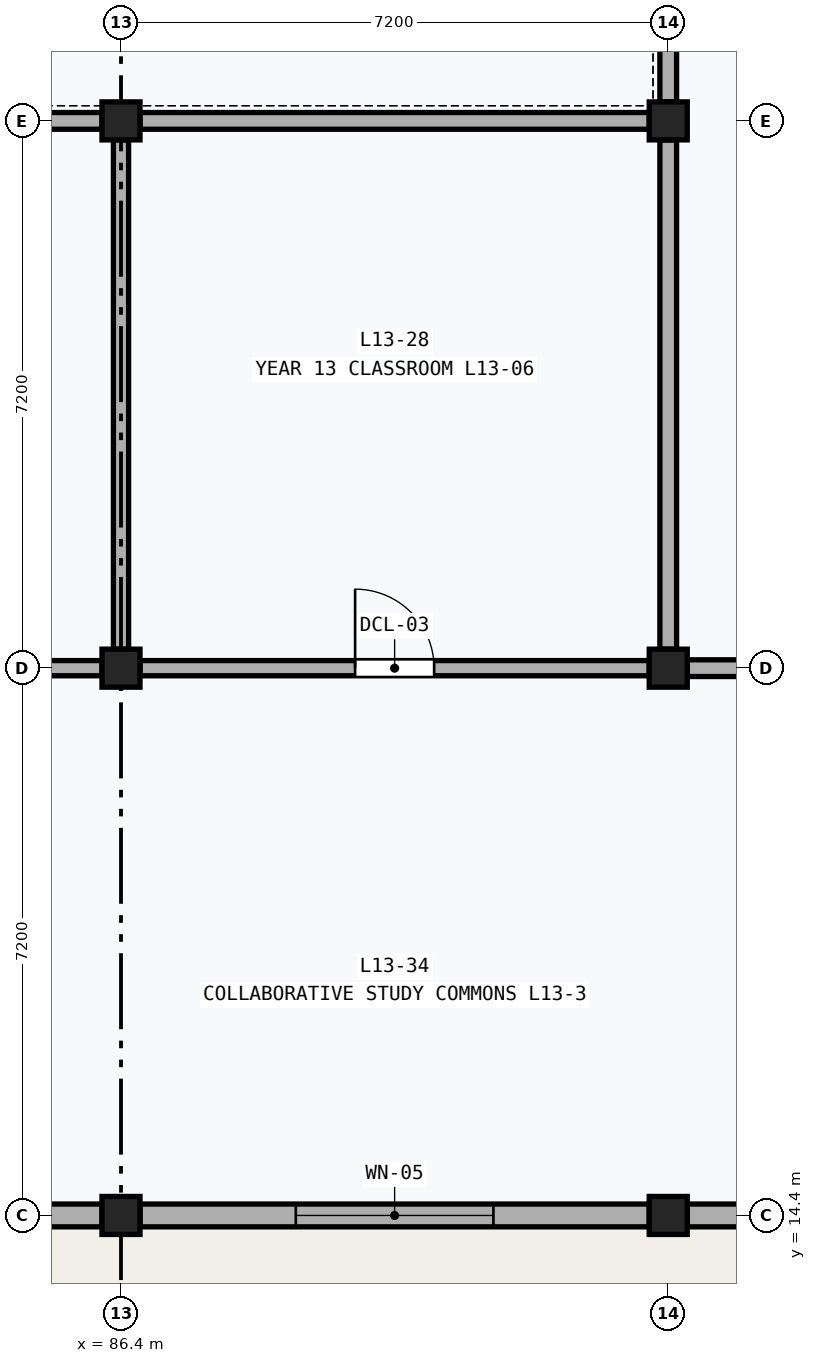
"""IFC4 building model, lengths in metres.
Left out: names, types, materials, properties, quantities, classifications, styles, units other than length and angle.
Written with IfcOpenShell. Run it as: python <this file> out.ifc"""

import sys

from ifc_helpers import new_model, si_unit, direction, frame, frame_2d, origin, origin_2d, place, context, subcontext, project, spatial, rectangle, extrude, element, fill, save


model = new_model("IFC4")
c1 = context("Model", 3, precision=1e-05, world=origin(), true_north=direction((0.0, 1.0)))
c2 = subcontext(c1, "Body", "Model", "MODEL_VIEW")
j1 = project(units=[si_unit("LENGTHUNIT", "METRE"), si_unit("PLANEANGLEUNIT", "RADIAN")], contexts=[c1])
p1 = place(None, origin())
s1 = spatial("IfcSite", under=j1, at=p1, CompositionType="ELEMENT")
p2 = place(p1, origin())
s2 = spatial("IfcBuilding", under=s1, at=p2, CompositionType="ELEMENT")
p3 = place(p2, frame((0.0, 0.0, 55.0)))
s3 = spatial("IfcBuildingStorey", under=s2, at=p3, CompositionType="ELEMENT", Elevation=55.0)
for number, where, z_axis, x_axis in (
    (1, (86.4, 14.4, 0.0), (0.0, 0.0, 1.0), (1.0, 0.0, 0.0)),
    (2, (86.4, 21.6, 0.0), (0.0, 0.0, 1.0), (1.0, 0.0, 0.0)),
    (3, (86.4, 28.8, 0.0), (0.0, 0.0, 1.0), (1.0, 0.0, 0.0)),
    (4, (93.6, 14.4, 0.0), (0.0, 0.0, 1.0), (1.0, 0.0, 0.0)),
    (5, (93.6, 21.6, 0.0), (0.0, 0.0, 1.0), (1.0, 0.0, 0.0)),
    (6, (93.6, 28.8, 0.0), (0.0, 0.0, 1.0), (1.0, 0.0, 0.0)),
):
    element("IfcColumn", number, at=place(p3, frame(where, z_axis=z_axis, x_axis=x_axis)), inside=s3, PredefinedType="COLUMN", context=c2, shape_type="SweptSolid", body=[
        extrude(rectangle(XDim=0.5, YDim=0.5, at=origin_2d()), origin(), (0.0, 0.0, 1.0), 4.0),
    ])
p4 = place(p3, frame((79.45, 14.4, 0.0), z_axis=(0.0, 0.0, 1.0), x_axis=(1.0, 0.0, 0.0)))
e7 = element("IfcWall", 7, at=p4, inside=s3, PredefinedType="SOLIDWALL", context=c2, shape_type="SweptSolid", body=[
    extrude(rectangle(XDim=6.7, YDim=0.3, at=frame_2d((3.35, 0.0))), origin(), (0.0, 0.0, 1.0), 3.17),
])
p5 = place(p4, frame((2.15, 0.0, 0.9)))
e8 = element("IfcOpeningElement", 8, at=p5, cuts=e7, PredefinedType="OPENING", context=c2, shape_type="SweptSolid", body=[
    extrude(rectangle(XDim=2.4, YDim=1.8, at=frame_2d((1.2, 0.9))), frame((0.0, 0.162, 0.0), z_axis=(0.0, -1.0, 0.0), x_axis=(1.0, 0.0, 0.0)), (0.0, 0.0, 1.0), 0.324),
])
p6 = place(p3, frame((86.65, 14.4, 0.0), z_axis=(0.0, 0.0, 1.0), x_axis=(1.0, 0.0, 0.0)))
e9 = element("IfcWall", 9, at=p6, inside=s3, PredefinedType="SOLIDWALL", context=c2, shape_type="SweptSolid", body=[
    extrude(rectangle(XDim=6.7, YDim=0.3, at=frame_2d((3.35, 0.0))), origin(), (0.0, 0.0, 1.0), 3.17),
])
p7 = place(p6, frame((2.05, 0.0, 0.9)))
e10 = element("IfcOpeningElement", 10, at=p7, cuts=e9, PredefinedType="OPENING", context=c2, shape_type="SweptSolid", body=[
    extrude(rectangle(XDim=2.6, YDim=1.8, at=frame_2d((1.3, 0.9))), frame((0.0, 0.162, 0.0), z_axis=(0.0, -1.0, 0.0), x_axis=(1.0, 0.0, 0.0)), (0.0, 0.0, 1.0), 0.324),
])
p8 = place(p3, frame((93.85, 14.4, 0.0), z_axis=(0.0, 0.0, 1.0), x_axis=(1.0, 0.0, 0.0)))
e11 = element("IfcWall", 11, at=p8, inside=s3, PredefinedType="SOLIDWALL", context=c2, shape_type="SweptSolid", body=[
    extrude(rectangle(XDim=6.77, YDim=0.3, at=frame_2d((3.385, 0.0))), origin(), (0.0, 0.0, 1.0), 3.17),
])
p9 = place(p8, frame((1.985, 0.0, 0.9)))
e12 = element("IfcOpeningElement", 12, at=p9, cuts=e11, PredefinedType="OPENING", context=c2, shape_type="SweptSolid", body=[
    extrude(rectangle(XDim=2.8, YDim=1.8, at=frame_2d((1.4, 0.9))), frame((0.0, 0.162, 0.0), z_axis=(0.0, -1.0, 0.0), x_axis=(1.0, 0.0, 0.0)), (0.0, 0.0, 1.0), 0.324),
])
p10 = place(p3, frame((79.45, 28.8, 0.0), z_axis=(0.0, 0.0, 1.0), x_axis=(1.0, 0.0, 0.0)))
e13 = element("IfcWall", 13, at=p10, inside=s3, PredefinedType="PARTITIONING", context=c2, shape_type="SweptSolid", body=[
    extrude(rectangle(XDim=6.7, YDim=0.22, at=frame_2d((3.35, 0.0))), origin(), (0.0, 0.0, 1.0), 3.09),
])
p11 = place(p3, frame((86.65, 28.8, 0.0), z_axis=(0.0, 0.0, 1.0), x_axis=(1.0, 0.0, 0.0)))
e14 = element("IfcWall", 14, at=p11, inside=s3, PredefinedType="PARTITIONING", context=c2, shape_type="SweptSolid", body=[
    extrude(rectangle(XDim=6.7, YDim=0.22, at=frame_2d((3.35, 0.0))), origin(), (0.0, 0.0, 1.0), 3.09),
])
p12 = place(p3, frame((93.6, 29.05, 0.0), z_axis=(0.0, 0.0, 1.0), x_axis=(0.0, 1.0, 0.0)))
e15 = element("IfcWall", 15, at=p12, inside=s3, PredefinedType="PARTITIONING", context=c2, shape_type="SweptSolid", body=[
    extrude(rectangle(XDim=6.7, YDim=0.22, at=frame_2d((3.35, 0.0))), origin(), (0.0, 0.0, 1.0), 3.09),
])
p13 = place(p3, frame((93.85, 21.6, 0.0), z_axis=(0.0, 0.0, 1.0), x_axis=(1.0, 0.0, 0.0)))
e16 = element("IfcWall", 16, at=p13, inside=s3, PredefinedType="PARTITIONING", context=c2, shape_type="SweptSolid", body=[
    extrude(rectangle(XDim=6.7, YDim=0.22, at=frame_2d((3.35, 0.0))), origin(), (0.0, 0.0, 1.0), 3.09),
])
p14 = place(p13, frame((2.79, 0.0, 0.0)))
e17 = element("IfcOpeningElement", 17, at=p14, cuts=e16, PredefinedType="OPENING", context=c2, shape_type="SweptSolid", body=[
    extrude(rectangle(XDim=1.12, YDim=2.2, at=frame_2d((0.56, 1.1))), frame((0.0, 0.122, 0.0), z_axis=(0.0, -1.0, 0.0), x_axis=(1.0, 0.0, 0.0)), (0.0, 0.0, 1.0), 0.244),
])
p15 = place(p3, frame((93.6, 21.85, 0.0), z_axis=(0.0, 0.0, 1.0), x_axis=(0.0, 1.0, 0.0)))
e18 = element("IfcWall", 18, at=p15, inside=s3, PredefinedType="PARTITIONING", context=c2, shape_type="SweptSolid", body=[
    extrude(rectangle(XDim=6.7, YDim=0.22, at=frame_2d((3.35, 0.0))), origin(), (0.0, 0.0, 1.0), 3.09),
])
p16 = place(p3, frame((79.45, 21.6, 0.0), z_axis=(0.0, 0.0, 1.0), x_axis=(1.0, 0.0, 0.0)))
e19 = element("IfcWall", 19, at=p16, inside=s3, PredefinedType="PARTITIONING", context=c2, shape_type="SweptSolid", body=[
    extrude(rectangle(XDim=6.7, YDim=0.2, at=frame_2d((3.35, 0.0))), origin(), (0.0, 0.0, 1.0), 3.09),
])
p17 = place(p16, frame((2.71, 0.0, 0.0)))
e20 = element("IfcOpeningElement", 20, at=p17, cuts=e19, PredefinedType="OPENING", context=c2, shape_type="SweptSolid", body=[
    extrude(rectangle(XDim=1.28, YDim=2.28, at=frame_2d((0.64, 1.14))), frame((0.0, 0.112, 0.0), z_axis=(0.0, -1.0, 0.0), x_axis=(1.0, 0.0, 0.0)), (0.0, 0.0, 1.0), 0.224),
])
p18 = place(p3, frame((86.4, 21.85, 0.0), z_axis=(0.0, 0.0, 1.0), x_axis=(0.0, 1.0, 0.0)))
e21 = element("IfcWall", 21, at=p18, inside=s3, PredefinedType="PARTITIONING", context=c2, shape_type="SweptSolid", body=[
    extrude(rectangle(XDim=6.7, YDim=0.2, at=frame_2d((3.35, 0.0))), origin(), (0.0, 0.0, 1.0), 3.09),
])
p19 = place(p3, frame((86.65, 21.6, 0.0), z_axis=(0.0, 0.0, 1.0), x_axis=(1.0, 0.0, 0.0)))
e22 = element("IfcWall", 22, at=p19, inside=s3, PredefinedType="PARTITIONING", context=c2, shape_type="SweptSolid", body=[
    extrude(rectangle(XDim=6.7, YDim=0.2, at=frame_2d((3.35, 0.0))), origin(), (0.0, 0.0, 1.0), 3.09),
])
p20 = place(p19, frame((2.83, 0.0, 0.0)))
e23 = element("IfcOpeningElement", 23, at=p20, cuts=e22, PredefinedType="OPENING", context=c2, shape_type="SweptSolid", body=[
    extrude(rectangle(XDim=1.04, YDim=2.14, at=frame_2d((0.52, 1.07))), frame((0.0, 0.112, 0.0), z_axis=(0.0, -1.0, 0.0), x_axis=(1.0, 0.0, 0.0)), (0.0, 0.0, 1.0), 0.224),
])
p21 = place(p7, origin())
e24 = element("IfcWindow", 24, at=p21, inside=s3, PartitioningType="SINGLE_PANEL", PredefinedType="WINDOW", context=c2, shape_type="SweptSolid", body=[
    extrude(rectangle(XDim=2.6, YDim=1.8, at=frame_2d((1.3, 0.9))), frame((0.0, 0.03, 0.0), z_axis=(0.0, -1.0, 0.0), x_axis=(1.0, 0.0, 0.0)), (0.0, 0.0, 1.0), 0.06),
])
fill(e10, e24)
p22 = place(p20, origin())
e25 = element("IfcDoor", 25, at=p22, inside=s3, OperationType="SINGLE_SWING_LEFT", PredefinedType="DOOR", context=c2, shape_type="SweptSolid", body=[
    extrude(rectangle(XDim=1.04, YDim=2.14, at=frame_2d((0.52, 1.07))), frame((0.0, 0.025, 0.0), z_axis=(0.0, -1.0, 0.0), x_axis=(1.0, 0.0, 0.0)), (0.0, 0.0, 1.0), 0.05),
])
fill(e23, e25)
save(model, sys.argv[1])
